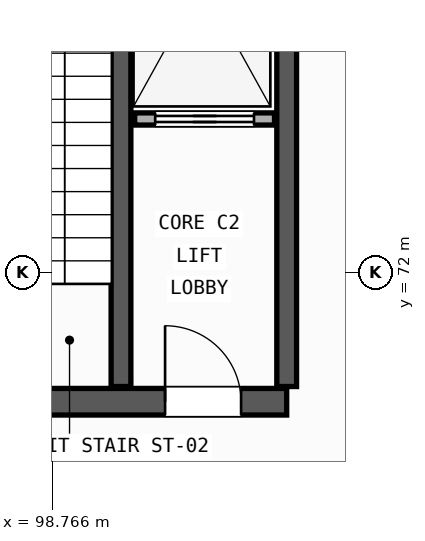
"""IFC4 building model, lengths in metres.
Left out: names, types, materials, properties, quantities, classifications, styles, units other than length and angle.
Written with IfcOpenShell. Run it as: python <this file> out.ifc"""

import sys

from ifc_helpers import new_model, si_unit, direction, frame, frame_2d, origin, place, context, subcontext, project, spatial, rectangle, extrude, element, fill, save


model = new_model("IFC4")
c1 = context("Model", 3, precision=1e-05, world=origin(), true_north=direction((0.0, 1.0)))
c2 = subcontext(c1, "Body", "Model", "MODEL_VIEW")
j1 = project(units=[si_unit("LENGTHUNIT", "METRE"), si_unit("PLANEANGLEUNIT", "RADIAN")], contexts=[c1])
p1 = place(None, origin())
s1 = spatial("IfcSite", under=j1, at=p1, CompositionType="ELEMENT")
p2 = place(p1, origin())
s2 = spatial("IfcBuilding", under=s1, at=p2, CompositionType="ELEMENT")
p3 = place(p2, frame((0.0, 0.0, 5.4)))
s3 = spatial("IfcBuildingStorey", under=s2, at=p3, CompositionType="ELEMENT", Elevation=5.4)
p4 = place(p3, frame((96.45, 70.3, 0.0), z_axis=(0.0, 0.0, 1.0), x_axis=(1.0, 0.0, 0.0)))
e1 = element("IfcWall", 1, at=p4, inside=s3, PredefinedType="SHEAR", context=c2, shape_type="SweptSolid", body=[
    extrude(rectangle(XDim=5.4, YDim=0.35, at=frame_2d((2.7, 0.0))), origin(), (0.0, 0.0, 1.0), 4.51),
])
p5 = place(p4, frame((0.95, 0.0, 0.0)))
e2 = element("IfcOpeningElement", 2, at=p5, cuts=e1, PredefinedType="OPENING", context=c2, shape_type="SweptSolid", body=[
    extrude(rectangle(XDim=1.05, YDim=2.1, at=frame_2d((0.525, 1.05))), frame((0.0, 0.185, 0.0), z_axis=(0.0, -1.0, 0.0), x_axis=(1.0, 0.0, 0.0)), (0.0, 0.0, 1.0), 0.37),
])
p6 = place(p4, frame((3.8, 0.0, 0.0)))
e3 = element("IfcOpeningElement", 3, at=p6, cuts=e1, PredefinedType="OPENING", context=c2, shape_type="SweptSolid", body=[
    extrude(rectangle(XDim=1.0, YDim=2.15, at=frame_2d((0.5, 1.075))), frame((0.0, 0.185, 0.0), z_axis=(0.0, -1.0, 0.0), x_axis=(1.0, 0.0, 0.0)), (0.0, 0.0, 1.0), 0.37),
])
for number, where, z_axis, x_axis in (
    (4, (101.85, 70.5, 0.0), (0.0, 0.0, 1.0), (0.0, 1.0, 0.0)),
    (5, (99.67, 70.5, 0.0), (0.0, 0.0, 1.0), (0.0, 1.0, 0.0)),
):
    element("IfcWall", number, at=place(p3, frame(where, z_axis=z_axis, x_axis=x_axis)), inside=s3, PredefinedType="SHEAR", context=c2, shape_type="SweptSolid", body=[
        extrude(rectangle(XDim=6.95, YDim=0.26, at=frame_2d((3.475, 0.0))), origin(), (0.0, 0.0, 1.0), 4.51),
    ])
p7 = place(p3, frame((99.85, 74.02, 0.0), z_axis=(0.0, 0.0, 1.0), x_axis=(1.0, 0.0, 0.0)))
e6 = element("IfcWall", 6, at=p7, inside=s3, PredefinedType="PARTITIONING", context=c2, shape_type="SweptSolid", body=[
    extrude(rectangle(XDim=1.84, YDim=0.16, at=frame_2d((0.92, 0.0))), origin(), (0.0, 0.0, 1.0), 3.6),
])
p8 = place(p7, frame((0.27, 0.0, 0.0)))
e7 = element("IfcOpeningElement", 7, at=p8, cuts=e6, PredefinedType="OPENING", context=c2, shape_type="SweptSolid", body=[
    extrude(rectangle(XDim=1.3, YDim=2.2, at=frame_2d((0.65, 1.1))), frame((0.0, 0.09, 0.0), z_axis=(0.0, -1.0, 0.0), x_axis=(1.0, 0.0, 0.0)), (0.0, 0.0, 1.0), 0.18),
])
p9 = place(p8, origin())
e8 = element("IfcDoor", 8, at=p9, inside=s3, OperationType="SLIDING_TO_LEFT", PredefinedType="DOOR", context=c2, shape_type="SweptSolid", body=[
    extrude(rectangle(XDim=1.3, YDim=2.2, at=frame_2d((0.65, 1.1))), frame((0.0, 0.025, 0.0), z_axis=(0.0, -1.0, 0.0), x_axis=(1.0, 0.0, 0.0)), (0.0, 0.0, 1.0), 0.05),
])
fill(e7, e8)
p10 = place(p6, origin())
e9 = element("IfcDoor", 9, at=p10, inside=s3, OperationType="SINGLE_SWING_LEFT", PredefinedType="DOOR", context=c2, shape_type="SweptSolid", body=[
    extrude(rectangle(XDim=1.0, YDim=2.15, at=frame_2d((0.5, 1.075))), frame((0.0, 0.025, 0.0), z_axis=(0.0, -1.0, 0.0), x_axis=(1.0, 0.0, 0.0)), (0.0, 0.0, 1.0), 0.05),
])
fill(e3, e9)
save(model, sys.argv[1])
